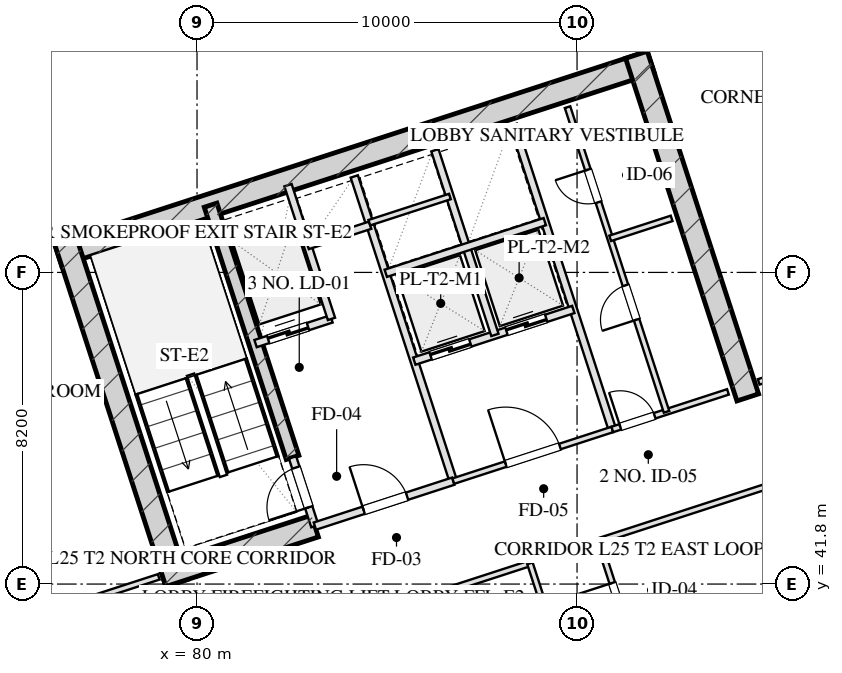
"""IFC4 building model, lengths in metres.
Left out: names, types, materials, properties, quantities, classifications, styles, units other than length and angle.
Written with IfcOpenShell. Run it as: python <this file> out.ifc"""

import sys

from ifc_helpers import new_model, si_unit, direction, frame, frame_2d, origin, place, context, subcontext, project, spatial, rectangle, extrude, element, fill, save


model = new_model("IFC4")
c1 = context("Model", 3, precision=1e-05, world=origin(), true_north=direction((0.0, 1.0)))
c2 = subcontext(c1, "Body", "Model", "MODEL_VIEW")
j1 = project(units=[si_unit("LENGTHUNIT", "METRE"), si_unit("PLANEANGLEUNIT", "RADIAN")], contexts=[c1])
p1 = place(None, origin())
s1 = spatial("IfcSite", under=j1, at=p1, CompositionType="ELEMENT")
p2 = place(p1, origin())
s2 = spatial("IfcBuilding", under=s1, at=p2, CompositionType="ELEMENT")
p3 = place(p2, frame((0.0, 0.0, 100.05)))
s3 = spatial("IfcBuildingStorey", under=s2, at=p3, CompositionType="ELEMENT", Elevation=100.05)
p4 = place(p3, frame((76.344, 50.466, 0.0), z_axis=(0.0, 0.0, 1.0), x_axis=(0.951055727519, 0.309019421968, 0.0)))
e1 = element("IfcWall", 1, at=p4, inside=s3, PredefinedType="SHEAR", context=c2, shape_type="SweptSolid", body=[
    extrude(rectangle(XDim=16.4, YDim=0.6, at=frame_2d((8.2, 0.0))), origin(), (0.0, 0.0, 1.0), 3.45),
])
for number, where, z_axis, x_axis in (
    (2, (79.466, 41.828, 0.0), (0.0, 0.0, 1.0), (-0.309, 0.951, 0.0)),
    (3, (94.492, 46.71, 0.0), (0.0, 0.0, 1.0), (-0.309, 0.951, 0.0)),
):
    element("IfcWall", number, at=place(p3, frame(where, z_axis=z_axis, x_axis=x_axis)), inside=s3, PredefinedType="SHEAR", context=c2, shape_type="SweptSolid", body=[
        extrude(rectangle(XDim=9.48, YDim=0.6, at=frame_2d((4.74, 0.0))), origin(), (0.0, 0.0, 1.0), 3.45),
    ])
p5 = place(p3, frame((82.514, 45.131, 0.0), z_axis=(0.0, 0.0, 1.0), x_axis=(-0.308988790936, 0.951065679686, 0.0)))
e4 = element("IfcWall", 4, at=p5, inside=s3, PredefinedType="SHEAR", context=c2, shape_type="SweptSolid", body=[
    extrude(rectangle(XDim=6.98, YDim=0.35, at=frame_2d((3.49, 0.0))), origin(), (0.0, 0.0, 1.0), 3.45),
])
p6 = place(p3, frame((79.087, 42.021, 0.0), z_axis=(0.0, 0.0, 1.0), x_axis=(0.951062550203, 0.3089984233, 0.0)))
e5 = element("IfcWall", 5, at=p6, inside=s3, PredefinedType="SHEAR", context=c2, shape_type="SweptSolid", body=[
    extrude(rectangle(XDim=4.22, YDim=0.6, at=frame_2d((2.11, 0.0))), origin(), (0.0, 0.0, 1.0), 3.45),
])
p7 = place(p3, frame((80.716, 6.59, 0.0), z_axis=(0.0, 0.0, 1.0), x_axis=(-0.309017542002, 0.95105633836, 0.0)))
e6 = element("IfcWall", 6, at=p7, inside=s3, PredefinedType="SOLIDWALL", context=c2, shape_type="SweptSolid", body=[
    extrude(rectangle(XDim=46.4, YDim=0.4, at=frame_2d((23.2, 0.0))), origin(), (0.0, 0.0, 1.0), 2.55),
])
p8 = place(p7, frame((15.6, 0.0, 0.75)))
e7 = element("IfcOpeningElement", 7, at=p8, cuts=e6, PredefinedType="OPENING", context=c2, shape_type="SweptSolid", body=[
    extrude(rectangle(XDim=2.4, YDim=1.4, at=frame_2d((1.2, 0.7))), frame((0.0, 0.21, 0.0), z_axis=(0.0, -1.0, 0.0), x_axis=(1.0, 0.0, 0.0)), (0.0, 0.0, 1.0), 0.42),
])
p9 = place(p7, frame((19.4, 0.0, 0.75)))
e8 = element("IfcOpeningElement", 8, at=p9, cuts=e6, PredefinedType="OPENING", context=c2, shape_type="SweptSolid", body=[
    extrude(rectangle(XDim=2.4, YDim=1.4, at=frame_2d((1.2, 0.7))), frame((0.0, 0.21, 0.0), z_axis=(0.0, -1.0, 0.0), x_axis=(1.0, 0.0, 0.0)), (0.0, 0.0, 1.0), 0.42),
])
p10 = place(p7, frame((25.496, 0.0, 0.0)))
e9 = element("IfcOpeningElement", 9, at=p10, cuts=e6, PredefinedType="OPENING", context=c2, shape_type="SweptSolid", body=[
    extrude(rectangle(XDim=1.1, YDim=2.15, at=frame_2d((0.55, 1.075))), frame((0.0, 0.21, 0.0), z_axis=(0.0, -1.0, 0.0), x_axis=(1.0, 0.0, 0.0)), (0.0, 0.0, 1.0), 0.42),
])
p11 = place(p3, frame((68.047, 53.995, 0.0), z_axis=(0.0, 0.0, 1.0), x_axis=(0.95105505922, 0.309021478754, 0.0)))
e10 = element("IfcWall", 10, at=p11, inside=s3, PredefinedType="SOLIDWALL", context=c2, shape_type="SweptSolid", body=[
    extrude(rectangle(XDim=29.4, YDim=0.4, at=frame_2d((14.7, 0.0))), origin(), (0.0, 0.0, 1.0), 2.55),
])
p12 = place(p3, frame((83.101, 43.324, 0.0), z_axis=(0.0, 0.0, 1.0), x_axis=(-0.309048298632, 0.951046344356, 0.0)))
e11 = element("IfcWall", 11, at=p12, inside=s3, PredefinedType="PARTITIONING", context=c2, shape_type="SweptSolid", body=[
    extrude(rectangle(XDim=1.9, YDim=0.2, at=frame_2d((0.95, 0.0))), origin(), (0.0, 0.0, 1.0), 3.155),
])
p13 = place(p12, frame((0.52, 0.0, 0.0)))
e12 = element("IfcOpeningElement", 12, at=p13, cuts=e11, PredefinedType="OPENING", context=c2, shape_type="SweptSolid", body=[
    extrude(rectangle(XDim=1.1, YDim=2.05, at=frame_2d((0.55, 1.025))), frame((0.0, 0.11, 0.0), z_axis=(0.0, -1.0, 0.0), x_axis=(1.0, 0.0, 0.0)), (0.0, 0.0, 1.0), 0.22),
])
p14 = place(p3, frame((86.743, 44.508, 0.0), z_axis=(0.0, 0.0, 1.0), x_axis=(-0.309016001439, 0.951056838919, 0.0)))
e13 = element("IfcWall", 13, at=p14, inside=s3, PredefinedType="PARTITIONING", context=c2, shape_type="SweptSolid", body=[
    extrude(rectangle(XDim=8.43, YDim=0.2, at=frame_2d((4.215, 0.0))), origin(), (0.0, 0.0, 1.0), 3.155),
])
p15 = place(p3, frame((83.101, 43.324, 0.0), z_axis=(0.0, 0.0, 1.0), x_axis=(0.951052804469, 0.309028417967, 0.0)))
e14 = element("IfcWall", 14, at=p15, inside=s3, PredefinedType="PARTITIONING", context=c2, shape_type="SweptSolid", body=[
    extrude(rectangle(XDim=3.83, YDim=0.2, at=frame_2d((1.915, 0.0))), origin(), (0.0, 0.0, 1.0), 3.155),
])
p16 = place(p15, frame((1.35, 0.0, 0.0)))
e15 = element("IfcOpeningElement", 15, at=p16, cuts=e14, PredefinedType="OPENING", context=c2, shape_type="SweptSolid", body=[
    extrude(rectangle(XDim=1.2, YDim=2.05, at=frame_2d((0.6, 1.025))), frame((0.0, 0.11, 0.0), z_axis=(0.0, -1.0, 0.0), x_axis=(1.0, 0.0, 0.0)), (0.0, 0.0, 1.0), 0.22),
])
p17 = place(p3, frame((81.54, 48.127, 0.0), z_axis=(0.0, 0.0, 1.0), x_axis=(0.951062257173, 0.308999325213, 0.0)))
e16 = element("IfcWall", 16, at=p17, inside=s3, PredefinedType="PARTITIONING", context=c2, shape_type="SweptSolid", body=[
    extrude(rectangle(XDim=2.1, YDim=0.2, at=frame_2d((1.05, 0.0))), origin(), (0.0, 0.0, 1.0), 3.155),
])
p18 = place(p17, frame((0.35, 0.0, 0.0)))
e17 = element("IfcOpeningElement", 17, at=p18, cuts=e16, PredefinedType="OPENING", context=c2, shape_type="SweptSolid", body=[
    extrude(rectangle(XDim=1.1, YDim=2.05, at=frame_2d((0.55, 1.025))), frame((0.0, 0.11, 0.0), z_axis=(0.0, -1.0, 0.0), x_axis=(1.0, 0.0, 0.0)), (0.0, 0.0, 1.0), 0.22),
])
p19 = place(p3, frame((83.538, 48.776, 0.0), z_axis=(0.0, 0.0, 1.0), x_axis=(-0.3089935693, 0.951064127245, 0.0)))
e18 = element("IfcWall", 18, at=p19, inside=s3, PredefinedType="PARTITIONING", context=c2, shape_type="SweptSolid", body=[
    extrude(rectangle(XDim=3.7, YDim=0.2, at=frame_2d((1.85, 0.0))), origin(), (0.0, 0.0, 1.0), 3.155),
])
p20 = place(p3, frame((82.91, 50.707, 0.0), z_axis=(0.0, 0.0, 1.0), x_axis=(0.951041328149, 0.309063734775, 0.0)))
e19 = element("IfcWall", 19, at=p20, inside=s3, PredefinedType="PARTITIONING", context=c2, shape_type="SweptSolid", body=[
    extrude(rectangle(XDim=1.73, YDim=0.2, at=frame_2d((0.865, 0.0))), origin(), (0.0, 0.0, 1.0), 3.155),
])
p21 = place(p3, frame((90.928, 45.868, 0.0), z_axis=(0.0, 0.0, 1.0), x_axis=(-0.309042196757, 0.951048327176, 0.0)))
e20 = element("IfcWall", 20, at=p21, inside=s3, PredefinedType="PARTITIONING", context=c2, shape_type="SweptSolid", body=[
    extrude(rectangle(XDim=8.43, YDim=0.2, at=frame_2d((4.215, 0.0))), origin(), (0.0, 0.0, 1.0), 3.155),
])
p22 = place(p3, frame((86.743, 44.508, 0.0), z_axis=(0.0, 0.0, 1.0), x_axis=(0.951063829732, 0.308994485023, 0.0)))
e21 = element("IfcWall", 21, at=p22, inside=s3, PredefinedType="PARTITIONING", context=c2, shape_type="SweptSolid", body=[
    extrude(rectangle(XDim=4.4, YDim=0.15, at=frame_2d((2.2, 0.0))), origin(), (0.0, 0.0, 1.0), 3.155),
])
p23 = place(p22, frame((1.45, 0.0, 0.0)))
e22 = element("IfcOpeningElement", 22, at=p23, cuts=e21, PredefinedType="OPENING", context=c2, shape_type="SweptSolid", body=[
    extrude(rectangle(XDim=1.5, YDim=2.05, at=frame_2d((0.75, 1.025))), frame((0.0, 0.085, 0.0), z_axis=(0.0, -1.0, 0.0), x_axis=(1.0, 0.0, 0.0)), (0.0, 0.0, 1.0), 0.17),
])
p24 = place(p3, frame((85.718, 47.666, 0.0), z_axis=(0.0, 0.0, 1.0), x_axis=(0.951058531764, 0.30901079133, 0.0)))
e23 = element("IfcWall", 23, at=p24, inside=s3, PredefinedType="PARTITIONING", context=c2, shape_type="SweptSolid", body=[
    extrude(rectangle(XDim=4.4, YDim=0.2, at=frame_2d((2.2, 0.0))), origin(), (0.0, 0.0, 1.0), 3.155),
])
p25 = place(p24, frame((0.45, 0.0, 0.0)))
e24 = element("IfcOpeningElement", 24, at=p25, cuts=e23, PredefinedType="OPENING", context=c2, shape_type="SweptSolid", body=[
    extrude(rectangle(XDim=1.1, YDim=2.05, at=frame_2d((0.55, 1.025))), frame((0.0, 0.11, 0.0), z_axis=(0.0, -1.0, 0.0), x_axis=(1.0, 0.0, 0.0)), (0.0, 0.0, 1.0), 0.22),
])
p26 = place(p24, frame((2.55, 0.0, 0.0)))
e25 = element("IfcOpeningElement", 25, at=p26, cuts=e23, PredefinedType="OPENING", context=c2, shape_type="SweptSolid", body=[
    extrude(rectangle(XDim=1.1, YDim=2.05, at=frame_2d((0.55, 1.025))), frame((0.0, 0.11, 0.0), z_axis=(0.0, -1.0, 0.0), x_axis=(1.0, 0.0, 0.0)), (0.0, 0.0, 1.0), 0.22),
])
p27 = place(p3, frame((87.838, 48.354, 0.0), z_axis=(0.0, 0.0, 1.0), x_axis=(-0.3090093719, 0.951058992953, 0.0)))
e26 = element("IfcWall", 26, at=p27, inside=s3, PredefinedType="PARTITIONING", context=c2, shape_type="SweptSolid", body=[
    extrude(rectangle(XDim=5.11, YDim=0.2, at=frame_2d((2.555, 0.0))), origin(), (0.0, 0.0, 1.0), 3.155),
])
p28 = place(p3, frame((84.967, 49.977, 0.0), z_axis=(0.0, 0.0, 1.0), x_axis=(0.951063829732, 0.308994485023, 0.0)))
e27 = element("IfcWall", 27, at=p28, inside=s3, PredefinedType="PARTITIONING", context=c2, shape_type="SweptSolid", body=[
    extrude(rectangle(XDim=4.4, YDim=0.2, at=frame_2d((2.2, 0.0))), origin(), (0.0, 0.0, 1.0), 3.155),
])
p29 = place(p3, frame((84.534, 51.308, 0.0), z_axis=(0.0, 0.0, 1.0), x_axis=(0.951075093106, 0.308959814982, 0.0)))
e28 = element("IfcWall", 28, at=p29, inside=s3, PredefinedType="PARTITIONING", context=c2, shape_type="SweptSolid", body=[
    extrude(rectangle(XDim=2.23, YDim=0.15, at=frame_2d((1.115, 0.0))), origin(), (0.0, 0.0, 1.0), 3.155),
])
p30 = place(p3, frame((90.928, 45.868, 0.0), z_axis=(0.0, 0.0, 1.0), x_axis=(0.951059297078, 0.309008435874, 0.0)))
e29 = element("IfcWall", 29, at=p30, inside=s3, PredefinedType="PARTITIONING", context=c2, shape_type="SweptSolid", body=[
    extrude(rectangle(XDim=3.2, YDim=0.15, at=frame_2d((1.6, 0.0))), origin(), (0.0, 0.0, 1.0), 3.155),
])
p31 = place(p30, frame((0.22, 0.0, 0.0)))
e30 = element("IfcOpeningElement", 30, at=p31, cuts=e29, PredefinedType="OPENING", context=c2, shape_type="SweptSolid", body=[
    extrude(rectangle(XDim=0.95, YDim=2.05, at=frame_2d((0.475, 1.025))), frame((0.0, 0.085, 0.0), z_axis=(0.0, -1.0, 0.0), x_axis=(1.0, 0.0, 0.0)), (0.0, 0.0, 1.0), 0.17),
])
p32 = place(p3, frame((92.355, 46.331, 0.0), z_axis=(0.0, 0.0, 1.0), x_axis=(-0.309007490203, 0.951059604335, 0.0)))
e31 = element("IfcWall", 31, at=p32, inside=s3, PredefinedType="PARTITIONING", context=c2, shape_type="SweptSolid", body=[
    extrude(rectangle(XDim=8.43, YDim=0.15, at=frame_2d((4.215, 0.0))), origin(), (0.0, 0.0, 1.0), 3.155),
])
p33 = place(p32, frame((2.55, 0.0, 0.0)))
e32 = element("IfcOpeningElement", 32, at=p33, cuts=e31, PredefinedType="OPENING", context=c2, shape_type="SweptSolid", body=[
    extrude(rectangle(XDim=0.95, YDim=2.05, at=frame_2d((0.475, 1.025))), frame((0.0, 0.085, 0.0), z_axis=(0.0, -1.0, 0.0), x_axis=(1.0, 0.0, 0.0)), (0.0, 0.0, 1.0), 0.17),
])
p34 = place(p32, frame((5.8, 0.0, 0.0)))
e33 = element("IfcOpeningElement", 33, at=p34, cuts=e31, PredefinedType="OPENING", context=c2, shape_type="SweptSolid", body=[
    extrude(rectangle(XDim=0.9, YDim=2.05, at=frame_2d((0.45, 1.025))), frame((0.0, 0.085, 0.0), z_axis=(0.0, -1.0, 0.0), x_axis=(1.0, 0.0, 0.0)), (0.0, 0.0, 1.0), 0.17),
])
p35 = place(p3, frame((90.871, 50.896, 0.0), z_axis=(0.0, 0.0, 1.0), x_axis=(0.951054116971, 0.309024378638, 0.0)))
e34 = element("IfcWall", 34, at=p35, inside=s3, PredefinedType="PARTITIONING", context=c2, shape_type="SweptSolid", body=[
    extrude(rectangle(XDim=1.7, YDim=0.15, at=frame_2d((0.85, 0.0))), origin(), (0.0, 0.0, 1.0), 3.155),
])
p36 = place(p3, frame((70.338, 39.177, 0.0), z_axis=(0.0, 0.0, 1.0), x_axis=(0.951059695568, 0.309007209409, 0.0)))
e35 = element("IfcWall", 35, at=p36, inside=s3, PredefinedType="PARTITIONING", context=c2, shape_type="SweptSolid", body=[
    extrude(rectangle(XDim=9.1, YDim=0.15, at=frame_2d((4.55, 0.0))), origin(), (0.0, 0.0, 1.0), 3.155),
])
p37 = place(p36, frame((3.822, 0.0, 0.0)))
e36 = element("IfcOpeningElement", 36, at=p37, cuts=e35, PredefinedType="OPENING", context=c2, shape_type="SweptSolid", body=[
    extrude(rectangle(XDim=1.0, YDim=2.05, at=frame_2d((0.5, 1.025))), frame((0.0, 0.085, 0.0), z_axis=(0.0, -1.0, 0.0), x_axis=(1.0, 0.0, 0.0)), (0.0, 0.0, 1.0), 0.17),
])
p38 = place(p3, frame((94.78, 47.119, 0.0), z_axis=(0.0, 0.0, 1.0), x_axis=(0.951054329824, 0.309023723562, 0.0)))
e37 = element("IfcWall", 37, at=p38, inside=s3, PredefinedType="PARTITIONING", context=c2, shape_type="SweptSolid", body=[
    extrude(rectangle(XDim=8.5, YDim=0.15, at=frame_2d((4.25, 0.0))), origin(), (0.0, 0.0, 1.0), 3.155),
])
p39 = place(p38, frame((3.57, 0.0, 0.0)))
e38 = element("IfcOpeningElement", 38, at=p39, cuts=e37, PredefinedType="OPENING", context=c2, shape_type="SweptSolid", body=[
    extrude(rectangle(XDim=1.05, YDim=2.05, at=frame_2d((0.525, 1.025))), frame((0.0, 0.085, 0.0), z_axis=(0.0, -1.0, 0.0), x_axis=(1.0, 0.0, 0.0)), (0.0, 0.0, 1.0), 0.17),
])
p40 = place(p3, frame((80.534, 39.672, 0.0), z_axis=(0.0, 0.0, 1.0), x_axis=(0.951052319652, 0.309029910015, 0.0)))
e39 = element("IfcWall", 39, at=p40, inside=s3, PredefinedType="PARTITIONING", context=c2, shape_type="SweptSolid", body=[
    extrude(rectangle(XDim=8.65, YDim=0.15, at=frame_2d((4.325, 0.0))), origin(), (0.0, 0.0, 1.0), 3.155),
])
p41 = place(p3, frame((90.567, 42.933, 0.0), z_axis=(0.0, 0.0, 1.0), x_axis=(0.951058377365, 0.309011266531, 0.0)))
e40 = element("IfcWall", 40, at=p41, inside=s3, PredefinedType="PARTITIONING", context=c2, shape_type="SweptSolid", body=[
    extrude(rectangle(XDim=13.8, YDim=0.15, at=frame_2d((6.9, 0.0))), origin(), (0.0, 0.0, 1.0), 3.155),
])
p42 = place(p3, frame((93.903, 26.52, 0.0), z_axis=(0.0, 0.0, 1.0), x_axis=(-0.30901773025, 0.951056277195, 0.0)))
e41 = element("IfcWall", 41, at=p42, inside=s3, PredefinedType="PARTITIONING", context=c2, shape_type="SweptSolid", body=[
    extrude(rectangle(XDim=16.64, YDim=0.15, at=frame_2d((8.32, 0.0))), origin(), (0.0, 0.0, 1.0), 3.155),
])
p43 = place(p3, frame((95.709, 27.107, 0.0), z_axis=(0.0, 0.0, 1.0), x_axis=(-0.30901773025, 0.951056277195, 0.0)))
e42 = element("IfcWall", 42, at=p43, inside=s3, PredefinedType="PARTITIONING", context=c2, shape_type="SweptSolid", body=[
    extrude(rectangle(XDim=16.64, YDim=0.15, at=frame_2d((8.32, 0.0))), origin(), (0.0, 0.0, 1.0), 3.155),
])
p44 = place(p43, frame((1.164, 0.0, 0.0)))
e43 = element("IfcOpeningElement", 43, at=p44, cuts=e42, PredefinedType="OPENING", context=c2, shape_type="SweptSolid", body=[
    extrude(rectangle(XDim=1.0, YDim=2.05, at=frame_2d((0.5, 1.025))), frame((0.0, 0.085, 0.0), z_axis=(0.0, -1.0, 0.0), x_axis=(1.0, 0.0, 0.0)), (0.0, 0.0, 1.0), 0.17),
])
p45 = place(p43, frame((4.724, 0.0, 0.0)))
e44 = element("IfcOpeningElement", 44, at=p45, cuts=e42, PredefinedType="OPENING", context=c2, shape_type="SweptSolid", body=[
    extrude(rectangle(XDim=1.05, YDim=2.05, at=frame_2d((0.525, 1.025))), frame((0.0, 0.085, 0.0), z_axis=(0.0, -1.0, 0.0), x_axis=(1.0, 0.0, 0.0)), (0.0, 0.0, 1.0), 0.17),
])
p46 = place(p43, frame((7.82, 0.0, 0.0)))
e45 = element("IfcOpeningElement", 45, at=p46, cuts=e42, PredefinedType="OPENING", context=c2, shape_type="SweptSolid", body=[
    extrude(rectangle(XDim=1.0, YDim=2.05, at=frame_2d((0.5, 1.025))), frame((0.0, 0.085, 0.0), z_axis=(0.0, -1.0, 0.0), x_axis=(1.0, 0.0, 0.0)), (0.0, 0.0, 1.0), 0.17),
])
p47 = place(p43, frame((10.92, 0.0, 0.0)))
e46 = element("IfcOpeningElement", 46, at=p47, cuts=e42, PredefinedType="OPENING", context=c2, shape_type="SweptSolid", body=[
    extrude(rectangle(XDim=1.0, YDim=2.05, at=frame_2d((0.5, 1.025))), frame((0.0, 0.085, 0.0), z_axis=(0.0, -1.0, 0.0), x_axis=(1.0, 0.0, 0.0)), (0.0, 0.0, 1.0), 0.17),
])
p48 = place(p43, frame((14.48, 0.0, 0.0)))
e47 = element("IfcOpeningElement", 47, at=p48, cuts=e42, PredefinedType="OPENING", context=c2, shape_type="SweptSolid", body=[
    extrude(rectangle(XDim=1.0, YDim=2.05, at=frame_2d((0.5, 1.025))), frame((0.0, 0.085, 0.0), z_axis=(0.0, -1.0, 0.0), x_axis=(1.0, 0.0, 0.0)), (0.0, 0.0, 1.0), 0.17),
])
p49 = place(p3, frame((91.594, 39.775, 0.0), z_axis=(0.0, 0.0, 1.0), x_axis=(0.951056688031, 0.309016465825, 0.0)))
e48 = element("IfcWall", 48, at=p49, inside=s3, PredefinedType="PARTITIONING", context=c2, shape_type="SweptSolid", body=[
    extrude(rectangle(XDim=13.8, YDim=0.15, at=frame_2d((6.9, 0.0))), origin(), (0.0, 0.0, 1.0), 3.155),
])
p50 = place(p13, origin())
e49 = element("IfcDoor", 49, at=p50, inside=s3, OperationType="SINGLE_SWING_LEFT", PredefinedType="DOOR", context=c2, shape_type="SweptSolid", body=[
    extrude(rectangle(XDim=1.1, YDim=2.05, at=frame_2d((0.55, 1.025))), frame((0.0, 0.025, 0.0), z_axis=(0.0, -1.0, 0.0), x_axis=(1.0, 0.0, 0.0)), (0.0, 0.0, 1.0), 0.05),
])
fill(e12, e49)
p51 = place(p16, origin())
e50 = element("IfcDoor", 50, at=p51, inside=s3, OperationType="SINGLE_SWING_LEFT", PredefinedType="DOOR", context=c2, shape_type="SweptSolid", body=[
    extrude(rectangle(XDim=1.2, YDim=2.05, at=frame_2d((0.6, 1.025))), frame((0.0, 0.025, 0.0), z_axis=(0.0, -1.0, 0.0), x_axis=(1.0, 0.0, 0.0)), (0.0, 0.0, 1.0), 0.05),
])
fill(e15, e50)
p52 = place(p18, origin())
e51 = element("IfcDoor", 51, at=p52, inside=s3, OperationType="DOUBLE_DOOR_SLIDING", PredefinedType="DOOR", context=c2, shape_type="SweptSolid", body=[
    extrude(rectangle(XDim=1.1, YDim=2.05, at=frame_2d((0.55, 1.025))), frame((0.0, 0.025, 0.0), z_axis=(0.0, -1.0, 0.0), x_axis=(1.0, 0.0, 0.0)), (0.0, 0.0, 1.0), 0.05),
])
fill(e17, e51)
p53 = place(p23, origin())
e52 = element("IfcDoor", 52, at=p53, inside=s3, OperationType="SINGLE_SWING_LEFT", PredefinedType="DOOR", context=c2, shape_type="SweptSolid", body=[
    extrude(rectangle(XDim=1.5, YDim=2.05, at=frame_2d((0.75, 1.025))), frame((0.0, 0.025, 0.0), z_axis=(0.0, -1.0, 0.0), x_axis=(1.0, 0.0, 0.0)), (0.0, 0.0, 1.0), 0.05),
])
fill(e22, e52)
p54 = place(p25, origin())
e53 = element("IfcDoor", 53, at=p54, inside=s3, OperationType="DOUBLE_DOOR_SLIDING", PredefinedType="DOOR", context=c2, shape_type="SweptSolid", body=[
    extrude(rectangle(XDim=1.1, YDim=2.05, at=frame_2d((0.55, 1.025))), frame((0.0, 0.025, 0.0), z_axis=(0.0, -1.0, 0.0), x_axis=(1.0, 0.0, 0.0)), (0.0, 0.0, 1.0), 0.05),
])
fill(e24, e53)
p55 = place(p26, origin())
e54 = element("IfcDoor", 54, at=p55, inside=s3, OperationType="DOUBLE_DOOR_SLIDING", PredefinedType="DOOR", context=c2, shape_type="SweptSolid", body=[
    extrude(rectangle(XDim=1.1, YDim=2.05, at=frame_2d((0.55, 1.025))), frame((0.0, 0.025, 0.0), z_axis=(0.0, -1.0, 0.0), x_axis=(1.0, 0.0, 0.0)), (0.0, 0.0, 1.0), 0.05),
])
fill(e25, e54)
p56 = place(p31, origin())
e55 = element("IfcDoor", 55, at=p56, inside=s3, OperationType="SINGLE_SWING_LEFT", PredefinedType="DOOR", context=c2, shape_type="SweptSolid", body=[
    extrude(rectangle(XDim=0.95, YDim=2.05, at=frame_2d((0.475, 1.025))), frame((0.0, 0.025, 0.0), z_axis=(0.0, -1.0, 0.0), x_axis=(1.0, 0.0, 0.0)), (0.0, 0.0, 1.0), 0.05),
])
fill(e30, e55)
p57 = place(p33, origin())
e56 = element("IfcDoor", 56, at=p57, inside=s3, OperationType="SINGLE_SWING_LEFT", PredefinedType="DOOR", context=c2, shape_type="SweptSolid", body=[
    extrude(rectangle(XDim=0.95, YDim=2.05, at=frame_2d((0.475, 1.025))), frame((0.0, 0.025, 0.0), z_axis=(0.0, -1.0, 0.0), x_axis=(1.0, 0.0, 0.0)), (0.0, 0.0, 1.0), 0.05),
])
fill(e32, e56)
p58 = place(p34, origin())
e57 = element("IfcDoor", 57, at=p58, inside=s3, OperationType="SINGLE_SWING_RIGHT", PredefinedType="DOOR", context=c2, shape_type="SweptSolid", body=[
    extrude(rectangle(XDim=0.9, YDim=2.05, at=frame_2d((0.45, 1.025))), frame((0.0, 0.025, 0.0), z_axis=(0.0, -1.0, 0.0), x_axis=(1.0, 0.0, 0.0)), (0.0, 0.0, 1.0), 0.05),
])
fill(e33, e57)
p59 = place(p48, origin())
e58 = element("IfcDoor", 58, at=p59, inside=s3, OperationType="SINGLE_SWING_RIGHT", PredefinedType="DOOR", context=c2, shape_type="SweptSolid", body=[
    extrude(rectangle(XDim=1.0, YDim=2.05, at=frame_2d((0.5, 1.025))), frame((0.0, 0.025, 0.0), z_axis=(0.0, -1.0, 0.0), x_axis=(1.0, 0.0, 0.0)), (0.0, 0.0, 1.0), 0.05),
])
fill(e47, e58)
save(model, sys.argv[1])
